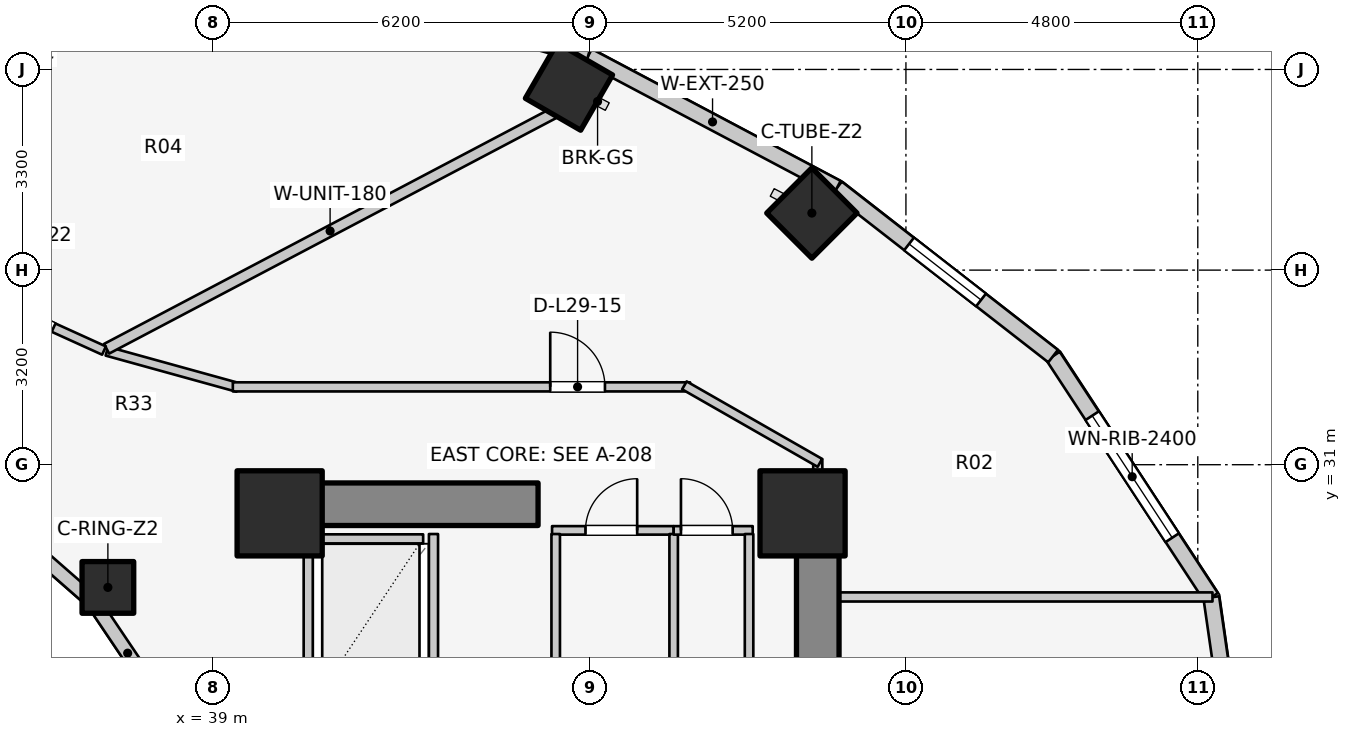
"""IFC4 building model, lengths in metres.
Left out: names, types, materials, properties, quantities, classifications, styles, units other than length and angle.
Written with IfcOpenShell. Run it as: python <this file> out.ifc"""

import sys

from ifc_helpers import new_model, si_unit, direction, frame, frame_2d, origin, origin_2d, place, context, subcontext, project, spatial, rectangle, extrude, element, fill, save


model = new_model("IFC4")
c1 = context("Model", 3, precision=1e-05, world=origin(), true_north=direction((0.0, 1.0)))
c2 = subcontext(c1, "Body", "Model", "MODEL_VIEW")
j1 = project(units=[si_unit("LENGTHUNIT", "METRE"), si_unit("PLANEANGLEUNIT", "RADIAN")], contexts=[c1])
p1 = place(None, origin())
s1 = spatial("IfcSite", under=j1, at=p1, CompositionType="ELEMENT")
p2 = place(p1, origin())
s2 = spatial("IfcBuilding", under=s1, at=p2, CompositionType="ELEMENT")
p3 = place(p2, frame((0.0, 0.0, 98.0)))
s3 = spatial("IfcBuildingStorey", under=s2, at=p3, CompositionType="ELEMENT", Elevation=98.0)
p4 = place(p3, frame((48.95, 17.05, 0.0), z_axis=(0.0, 0.0, 1.0), x_axis=(0.0, 1.0, 0.0)))
e1 = element("IfcWall", 1, at=p4, inside=s3, PredefinedType="SHEAR", context=c2, shape_type="SweptSolid", body=[
    extrude(rectangle(XDim=12.8, YDim=0.7, at=frame_2d((6.4, 0.0))), origin(), (0.0, 0.0, 1.0), 3.1),
])
p5 = place(p3, frame((39.85, 30.35, 0.0), z_axis=(0.0, 0.0, 1.0), x_axis=(1.0, 0.0, 0.0)))
e2 = element("IfcWall", 2, at=p5, inside=s3, PredefinedType="SHEAR", context=c2, shape_type="SweptSolid", body=[
    extrude(rectangle(XDim=4.5, YDim=0.7, at=frame_2d((2.25, 0.0))), origin(), (0.0, 0.0, 1.0), 3.1),
])
for number, where, z_axis, x_axis in (
    (3, (48.7, 30.2, 0.0), (0.0, 0.0, 1.0), (1.0, 0.0, 0.0)),
    (4, (40.1, 30.2, 0.0), (0.0, 0.0, 1.0), (1.0, 0.0, 0.0)),
):
    element("IfcColumn", number, at=place(p3, frame(where, z_axis=z_axis, x_axis=x_axis)), inside=s3, PredefinedType="COLUMN", context=c2, shape_type="SweptSolid", body=[
        extrude(rectangle(XDim=1.4, YDim=1.4, at=origin_2d()), origin(), (0.0, 0.0, 1.0), 3.1),
    ])
p6 = place(p3, frame((37.275, 28.982, 0.0), z_axis=(0.0, 0.0, 1.0), x_axis=(1.0, 0.0, 0.0)))
e5 = element("IfcColumn", 5, at=p6, inside=s3, PredefinedType="COLUMN", context=c2, shape_type="SweptSolid", body=[
    extrude(rectangle(XDim=0.85, YDim=0.85, at=origin_2d()), origin(), (0.0, 0.0, 1.0), 3.1),
])
for number, where, z_axis, x_axis in (
    (6, (48.853, 35.138, 0.0), (0.0, 0.0, 1.0), (0.707, 0.707, 0.0)),
    (7, (44.858, 37.218, 0.0), (0.0, 0.0, 1.0), (0.5, 0.866, 0.0)),
):
    element("IfcColumn", number, at=place(p3, frame(where, z_axis=z_axis, x_axis=x_axis)), inside=s3, PredefinedType="COLUMN", context=c2, shape_type="SweptSolid", body=[
        extrude(rectangle(XDim=1.05, YDim=1.05, at=origin_2d()), origin(), (0.0, 0.0, 1.0), 3.1),
    ])
p7 = place(p3, frame((38.166, 27.06, 0.0), z_axis=(0.0, 0.0, 1.0), x_axis=(-0.558197800898, 0.829707909492, 0.0)))
e8 = element("IfcWall", 8, at=p7, inside=s3, PredefinedType="STANDARD", context=c2, shape_type="SweptSolid", body=[
    extrude(rectangle(XDim=2.027, YDim=0.23, at=frame_2d((1.013, 0.0))), origin(), (0.0, 0.0, 1.0), 2.16),
])
p8 = place(p3, frame((37.035, 28.742, 0.0), z_axis=(0.0, 0.0, 1.0), x_axis=(-0.752576694707, 0.658504607869, 0.0)))
e9 = element("IfcWall", 9, at=p8, inside=s3, PredefinedType="STANDARD", context=c2, shape_type="SweptSolid", body=[
    extrude(rectangle(XDim=1.959, YDim=0.23, at=frame_2d((0.98, 0.0))), origin(), (0.0, 0.0, 1.0), 2.16),
])
p9 = place(p3, frame((56.26, 23.0, 0.0), z_axis=(0.0, 0.0, 1.0), x_axis=(-0.142572472068, 0.98978436551, 0.0)))
e10 = element("IfcWall", 10, at=p9, inside=s3, PredefinedType="STANDARD", context=c2, shape_type="SweptSolid", body=[
    extrude(rectangle(XDim=5.879, YDim=0.26, at=frame_2d((2.939, 0.0))), origin(), (0.0, 0.0, 1.0), 2.85),
])
p10 = place(p9, frame((2.189, 0.0, 0.75)))
e11 = element("IfcOpeningElement", 11, at=p10, cuts=e10, PredefinedType="OPENING", context=c2, shape_type="SweptSolid", body=[
    extrude(rectangle(XDim=1.5, YDim=1.6, at=frame_2d((0.75, 0.8))), frame((0.0, 0.14, 0.0), z_axis=(0.0, -1.0, 0.0), x_axis=(1.0, 0.0, 0.0)), (0.0, 0.0, 1.0), 0.28),
])
p11 = place(p3, frame((55.422, 28.819, 0.0), z_axis=(0.0, 0.0, 1.0), x_axis=(-0.548283220945, 0.836292717672, 0.0)))
e12 = element("IfcWall", 12, at=p11, inside=s3, PredefinedType="STANDARD", context=c2, shape_type="SweptSolid", body=[
    extrude(rectangle(XDim=4.744, YDim=0.26, at=frame_2d((2.372, 0.0))), origin(), (0.0, 0.0, 1.0), 2.85),
])
p12 = place(p11, frame((1.172, 0.0, 0.75)))
e13 = element("IfcOpeningElement", 13, at=p12, cuts=e12, PredefinedType="OPENING", context=c2, shape_type="SweptSolid", body=[
    extrude(rectangle(XDim=2.4, YDim=1.7, at=frame_2d((1.2, 0.85))), frame((0.0, 0.14, 0.0), z_axis=(0.0, -1.0, 0.0), x_axis=(1.0, 0.0, 0.0)), (0.0, 0.0, 1.0), 0.28),
])
p13 = place(p3, frame((52.821, 32.786, 0.0), z_axis=(0.0, 0.0, 1.0), x_axis=(-0.789127449954, 0.614229491094, 0.0)))
e14 = element("IfcWall", 14, at=p13, inside=s3, PredefinedType="STANDARD", context=c2, shape_type="SweptSolid", body=[
    extrude(rectangle(XDim=4.505, YDim=0.26, at=frame_2d((2.252, 0.0))), origin(), (0.0, 0.0, 1.0), 2.85),
])
p14 = place(p13, frame((1.502, 0.0, 0.75)))
e15 = element("IfcOpeningElement", 15, at=p14, cuts=e14, PredefinedType="OPENING", context=c2, shape_type="SweptSolid", body=[
    extrude(rectangle(XDim=1.5, YDim=1.6, at=frame_2d((0.75, 0.8))), frame((0.0, 0.14, 0.0), z_axis=(0.0, -1.0, 0.0), x_axis=(1.0, 0.0, 0.0)), (0.0, 0.0, 1.0), 0.28),
])
p15 = place(p3, frame((49.266, 35.553, 0.0), z_axis=(0.0, 0.0, 1.0), x_axis=(-0.883668636807, 0.4681129568, 0.0)))
e16 = element("IfcWall", 16, at=p15, inside=s3, PredefinedType="STANDARD", context=c2, shape_type="SweptSolid", body=[
    extrude(rectangle(XDim=4.631, YDim=0.26, at=frame_2d((2.316, 0.0))), origin(), (0.0, 0.0, 1.0), 2.85),
])
p16 = place(p3, frame((45.173, 37.721, 0.0), z_axis=(0.0, 0.0, 1.0), x_axis=(-0.962938491413, 0.269721081407, 0.0)))
e17 = element("IfcWall", 17, at=p16, inside=s3, PredefinedType="STANDARD", context=c2, shape_type="SweptSolid", body=[
    extrude(rectangle(XDim=5.563, YDim=0.26, at=frame_2d((2.782, 0.0))), origin(), (0.0, 0.0, 1.0), 2.85),
])
p17 = place(p16, frame((1.582, 0.0, 0.75)))
e18 = element("IfcOpeningElement", 18, at=p17, cuts=e17, PredefinedType="OPENING", context=c2, shape_type="SweptSolid", body=[
    extrude(rectangle(XDim=2.4, YDim=1.7, at=frame_2d((1.2, 0.85))), frame((0.0, 0.14, 0.0), z_axis=(0.0, -1.0, 0.0), x_axis=(1.0, 0.0, 0.0)), (0.0, 0.0, 1.0), 0.28),
])
p18 = place(p3, frame((40.74, 29.78, 0.0), z_axis=(0.0, 0.0, 1.0), x_axis=(1.0, 0.0, 0.0)))
e19 = element("IfcWall", 19, at=p18, inside=s3, PredefinedType="SOLIDWALL", context=c2, shape_type="SweptSolid", body=[
    extrude(rectangle(XDim=1.72, YDim=0.15, at=frame_2d((0.86, 0.0))), origin(), (0.0, 0.0, 1.0), 2.855),
])
for number, where, z_axis, x_axis in (
    (20, (40.57, 27.14, 0.0), (0.0, 0.0, 1.0), (0.0, 1.0, 0.0)),
    (21, (42.63, 27.14, 0.0), (0.0, 0.0, 1.0), (0.0, 1.0, 0.0)),
):
    element("IfcWall", number, at=place(p3, frame(where, z_axis=z_axis, x_axis=x_axis)), inside=s3, PredefinedType="SOLIDWALL", context=c2, shape_type="SweptSolid", body=[
        extrude(rectangle(XDim=2.72, YDim=0.15, at=frame_2d((1.36, 0.0))), origin(), (0.0, 0.0, 1.0), 2.855),
    ])
p19 = place(p3, frame((44.58, 29.92, 0.0), z_axis=(0.0, 0.0, 1.0), x_axis=(1.0, 0.0, 0.0)))
e22 = element("IfcWall", 22, at=p19, inside=s3, PredefinedType="PLUMBINGWALL", context=c2, shape_type="SweptSolid", body=[
    extrude(rectangle(XDim=2.0, YDim=0.14, at=frame_2d((1.0, 0.0))), origin(), (0.0, 0.0, 1.0), 2.855),
])
p20 = place(p19, frame((0.55, 0.0, 0.0)))
e23 = element("IfcOpeningElement", 23, at=p20, cuts=e22, PredefinedType="OPENING", context=c2, shape_type="SweptSolid", body=[
    extrude(rectangle(XDim=0.85, YDim=2.05, at=frame_2d((0.425, 1.025))), frame((0.0, 0.08, 0.0), z_axis=(0.0, -1.0, 0.0), x_axis=(1.0, 0.0, 0.0)), (0.0, 0.0, 1.0), 0.16),
])
for number, where, z_axis, x_axis in (
    (24, (44.64, 25.98, 0.0), (0.0, 0.0, 1.0), (0.0, 1.0, 0.0)),
    (25, (46.58, 25.98, 0.0), (0.0, 0.0, 1.0), (0.0, 1.0, 0.0)),
):
    element("IfcWall", number, at=place(p3, frame(where, z_axis=z_axis, x_axis=x_axis)), inside=s3, PredefinedType="PLUMBINGWALL", context=c2, shape_type="SweptSolid", body=[
        extrude(rectangle(XDim=3.88, YDim=0.14, at=frame_2d((1.94, 0.0))), origin(), (0.0, 0.0, 1.0), 2.855),
    ])
p21 = place(p3, frame((46.58, 29.92, 0.0), z_axis=(0.0, 0.0, 1.0), x_axis=(1.0, 0.0, 0.0)))
e26 = element("IfcWall", 26, at=p21, inside=s3, PredefinedType="PLUMBINGWALL", context=c2, shape_type="SweptSolid", body=[
    extrude(rectangle(XDim=1.3, YDim=0.14, at=frame_2d((0.65, 0.0))), origin(), (0.0, 0.0, 1.0), 2.855),
])
p22 = place(p21, frame((0.12, 0.0, 0.0)))
e27 = element("IfcOpeningElement", 27, at=p22, cuts=e26, PredefinedType="OPENING", context=c2, shape_type="SweptSolid", body=[
    extrude(rectangle(XDim=0.85, YDim=2.05, at=frame_2d((0.425, 1.025))), frame((0.0, 0.08, 0.0), z_axis=(0.0, -1.0, 0.0), x_axis=(1.0, 0.0, 0.0)), (0.0, 0.0, 1.0), 0.16),
])
p23 = place(p3, frame((47.82, 25.98, 0.0), z_axis=(0.0, 0.0, 1.0), x_axis=(0.0, 1.0, 0.0)))
e28 = element("IfcWall", 28, at=p23, inside=s3, PredefinedType="PLUMBINGWALL", context=c2, shape_type="SweptSolid", body=[
    extrude(rectangle(XDim=3.88, YDim=0.14, at=frame_2d((1.94, 0.0))), origin(), (0.0, 0.0, 1.0), 2.855),
])
p24 = place(p3, frame((48.95, 28.825, 0.0), z_axis=(0.0, 0.0, 1.0), x_axis=(1.0, 0.0, 0.0)))
e29 = element("IfcWall", 29, at=p24, inside=s3, PredefinedType="PARTITIONING", context=c2, shape_type="SweptSolid", body=[
    extrude(rectangle(XDim=6.492, YDim=0.15, at=frame_2d((3.246, 0.0))), origin(), (0.0, 0.0, 1.0), 2.855),
])
p25 = place(p3, frame((48.95, 29.8, 0.0), z_axis=(0.0, 0.0, 1.0), x_axis=(0.0, 1.0, 0.0)))
e30 = element("IfcWall", 30, at=p25, inside=s3, PredefinedType="PARTITIONING", context=c2, shape_type="SweptSolid", body=[
    extrude(rectangle(XDim=1.29, YDim=0.15, at=frame_2d((0.645, 0.0))), origin(), (0.0, 0.0, 1.0), 2.142),
])
p26 = place(p3, frame((37.258, 32.867, 0.0), z_axis=(0.0, 0.0, 1.0), x_axis=(0.963833843713, -0.266503886865, 0.0)))
e31 = element("IfcWall", 31, at=p26, inside=s3, PredefinedType="PARTITIONING", context=c2, shape_type="SweptSolid", body=[
    extrude(rectangle(XDim=2.232, YDim=0.15, at=frame_2d((1.116, 0.0))), origin(), (0.0, 0.0, 1.0), 2.272),
])
p27 = place(p3, frame((39.33, 32.28, 0.0), z_axis=(0.0, 0.0, 1.0), x_axis=(1.0, 0.0, 0.0)))
e32 = element("IfcWall", 32, at=p27, inside=s3, PredefinedType="PARTITIONING", context=c2, shape_type="SweptSolid", body=[
    extrude(rectangle(XDim=7.52, YDim=0.15, at=frame_2d((3.76, 0.0))), origin(), (0.0, 0.0, 1.0), 2.272),
])
p28 = place(p27, frame((5.22, 0.0, 0.0)))
e33 = element("IfcOpeningElement", 33, at=p28, cuts=e32, PredefinedType="OPENING", context=c2, shape_type="SweptSolid", body=[
    extrude(rectangle(XDim=0.9, YDim=2.1, at=frame_2d((0.45, 1.05))), frame((0.0, 0.085, 0.0), z_axis=(0.0, -1.0, 0.0), x_axis=(1.0, 0.0, 0.0)), (0.0, 0.0, 1.0), 0.17),
])
p29 = place(p3, frame((46.757, 32.305, 0.0), z_axis=(0.0, 0.0, 1.0), x_axis=(0.867991349648, -0.496579315857, 0.0)))
e34 = element("IfcWall", 34, at=p29, inside=s3, PredefinedType="PARTITIONING", context=c2, shape_type="SweptSolid", body=[
    extrude(rectangle(XDim=2.567, YDim=0.15, at=frame_2d((1.283, 0.0))), origin(), (0.0, 0.0, 1.0), 2.142),
])
p30 = place(p3, frame((37.254, 32.907, 0.0), z_axis=(0.0, 0.0, 1.0), x_axis=(0.884730147854, 0.466103599512, 0.0)))
e35 = element("IfcWall", 35, at=p30, inside=s3, PredefinedType="PARTITIONING", context=c2, shape_type="SweptSolid", body=[
    extrude(rectangle(XDim=8.31, YDim=0.18, at=frame_2d((4.155, 0.0))), origin(), (0.0, 0.0, 1.0), 2.272),
])
p31 = place(p3, frame((37.211, 32.877, 0.0), z_axis=(0.0, 0.0, 1.0), x_axis=(-0.910568469686, 0.41335827319, 0.0)))
e36 = element("IfcWall", 36, at=p31, inside=s3, PredefinedType="PARTITIONING", context=c2, shape_type="SweptSolid", body=[
    extrude(rectangle(XDim=2.772, YDim=0.15, at=frame_2d((1.386, 0.0))), origin(), (0.0, 0.0, 1.0), 2.272),
])
p32 = place(p31, frame((0.911, 0.0, 0.0)))
e37 = element("IfcOpeningElement", 37, at=p32, cuts=e36, PredefinedType="OPENING", context=c2, shape_type="SweptSolid", body=[
    extrude(rectangle(XDim=0.95, YDim=2.1, at=frame_2d((0.475, 1.05))), frame((0.0, 0.085, 0.0), z_axis=(0.0, -1.0, 0.0), x_axis=(1.0, 0.0, 0.0)), (0.0, 0.0, 1.0), 0.17),
])
p33 = place(p12, origin())
e38 = element("IfcWindow", 38, at=p33, inside=s3, PartitioningType="SINGLE_PANEL", PredefinedType="WINDOW", context=c2, shape_type="SweptSolid", body=[
    extrude(rectangle(XDim=2.4, YDim=1.7, at=frame_2d((1.2, 0.85))), frame((0.0, 0.03, 0.0), z_axis=(0.0, -1.0, 0.0), x_axis=(1.0, 0.0, 0.0)), (0.0, 0.0, 1.0), 0.06),
])
fill(e13, e38)
p34 = place(p14, origin())
e39 = element("IfcWindow", 39, at=p34, inside=s3, PartitioningType="SINGLE_PANEL", PredefinedType="WINDOW", context=c2, shape_type="SweptSolid", body=[
    extrude(rectangle(XDim=1.5, YDim=1.6, at=frame_2d((0.75, 0.8))), frame((0.0, 0.03, 0.0), z_axis=(0.0, -1.0, 0.0), x_axis=(1.0, 0.0, 0.0)), (0.0, 0.0, 1.0), 0.06),
])
fill(e15, e39)
p35 = place(p20, origin())
e40 = element("IfcDoor", 40, at=p35, inside=s3, OperationType="SINGLE_SWING_RIGHT", PredefinedType="DOOR", context=c2, shape_type="SweptSolid", body=[
    extrude(rectangle(XDim=0.85, YDim=2.05, at=frame_2d((0.425, 1.025))), frame((0.0, 0.025, 0.0), z_axis=(0.0, -1.0, 0.0), x_axis=(1.0, 0.0, 0.0)), (0.0, 0.0, 1.0), 0.05),
])
fill(e23, e40)
p36 = place(p22, origin())
e41 = element("IfcDoor", 41, at=p36, inside=s3, OperationType="SINGLE_SWING_LEFT", PredefinedType="DOOR", context=c2, shape_type="SweptSolid", body=[
    extrude(rectangle(XDim=0.85, YDim=2.05, at=frame_2d((0.425, 1.025))), frame((0.0, 0.025, 0.0), z_axis=(0.0, -1.0, 0.0), x_axis=(1.0, 0.0, 0.0)), (0.0, 0.0, 1.0), 0.05),
])
fill(e27, e41)
p37 = place(p28, origin())
e42 = element("IfcDoor", 42, at=p37, inside=s3, OperationType="SINGLE_SWING_LEFT", PredefinedType="DOOR", context=c2, shape_type="SweptSolid", body=[
    extrude(rectangle(XDim=0.9, YDim=2.1, at=frame_2d((0.45, 1.05))), frame((0.0, 0.025, 0.0), z_axis=(0.0, -1.0, 0.0), x_axis=(1.0, 0.0, 0.0)), (0.0, 0.0, 1.0), 0.05),
])
fill(e33, e42)
p38 = place(p32, origin())
e43 = element("IfcDoor", 43, at=p38, inside=s3, OperationType="SINGLE_SWING_RIGHT", PredefinedType="DOOR", context=c2, shape_type="SweptSolid", body=[
    extrude(rectangle(XDim=0.95, YDim=2.1, at=frame_2d((0.475, 1.05))), frame((0.0, 0.025, 0.0), z_axis=(0.0, -1.0, 0.0), x_axis=(1.0, 0.0, 0.0)), (0.0, 0.0, 1.0), 0.05),
])
fill(e37, e43)
save(model, sys.argv[1])
